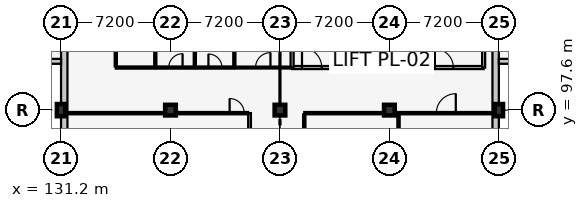
"""IFC4 building model, lengths in metres.
Left out: names, types, materials, properties, quantities, classifications, styles, units other than length and angle.
Written with IfcOpenShell. Run it as: python <this file> out.ifc"""

import sys

from ifc_helpers import new_model, si_unit, direction, frame, frame_2d, origin, origin_2d, place, context, subcontext, project, spatial, rectangle, extrude, element, fill, save


model = new_model("IFC4")
c1 = context("Model", 3, precision=1e-05, world=origin(), true_north=direction((0.0, 1.0)))
c2 = subcontext(c1, "Body", "Model", "MODEL_VIEW")
j1 = project(units=[si_unit("LENGTHUNIT", "METRE"), si_unit("PLANEANGLEUNIT", "RADIAN")], contexts=[c1])
p1 = place(None, origin())
s1 = spatial("IfcSite", under=j1, at=p1, CompositionType="ELEMENT")
p2 = place(p1, origin())
s2 = spatial("IfcBuilding", under=s1, at=p2, CompositionType="ELEMENT")
p3 = place(p2, frame((0.0, 0.0, 9.6)))
s3 = spatial("IfcBuildingStorey", under=s2, at=p3, CompositionType="ELEMENT", Elevation=9.6)
p4 = place(p3, frame((131.2, 97.6, 0.0), z_axis=(0.0, 0.0, 1.0), x_axis=(1.0, 0.0, 0.0)))
e1 = element("IfcColumn", 1, at=p4, inside=s3, PredefinedType="COLUMN", context=c2, shape_type="SweptSolid", body=[
    extrude(rectangle(XDim=0.55, YDim=0.8, at=origin_2d()), origin(), (0.0, 0.0, 1.0), 4.2),
])
for number, where, z_axis, x_axis in (
    (2, (138.4, 97.6, 0.0), (0.0, 0.0, 1.0), (1.0, 0.0, 0.0)),
    (3, (145.6, 97.6, 0.0), (0.0, 0.0, 1.0), (1.0, 0.0, 0.0)),
    (4, (152.8, 97.6, 0.0), (0.0, 0.0, 1.0), (1.0, 0.0, 0.0)),
):
    element("IfcColumn", number, at=place(p3, frame(where, z_axis=z_axis, x_axis=x_axis)), inside=s3, PredefinedType="COLUMN", context=c2, shape_type="SweptSolid", body=[
        extrude(rectangle(XDim=0.7, YDim=0.7, at=origin_2d()), origin(), (0.0, 0.0, 1.0), 4.2),
    ])
p5 = place(p3, frame((160.0, 97.6, 0.0), z_axis=(0.0, 0.0, 1.0), x_axis=(1.0, 0.0, 0.0)))
e5 = element("IfcColumn", 5, at=p5, inside=s3, PredefinedType="COLUMN", context=c2, shape_type="SweptSolid", body=[
    extrude(rectangle(XDim=0.55, YDim=0.8, at=origin_2d()), origin(), (0.0, 0.0, 1.0), 4.2),
])
p6 = place(p3, frame((159.79, 112.0, 0.0), z_axis=(0.0, 0.0, 1.0), x_axis=(0.0, -1.0, 0.0)))
e6 = element("IfcWall", 6, at=p6, inside=s3, PredefinedType="SOLIDWALL", context=c2, shape_type="SweptSolid", body=[
    extrude(rectangle(XDim=28.8, YDim=0.42, at=frame_2d((14.4, 0.0))), origin(), (0.0, 0.0, 1.0), 3.345),
])
p7 = place(p3, frame((160.0, 100.81, 0.0), z_axis=(0.0, 0.0, 1.0), x_axis=(1.0, 0.0, 0.0)))
e7 = element("IfcWall", 7, at=p7, inside=s3, PredefinedType="SOLIDWALL", context=c2, shape_type="SweptSolid", body=[
    extrude(rectangle(XDim=1.793, YDim=0.32, at=frame_2d((0.896, 0.0))), origin(), (0.0, 0.0, 1.0), 3.93),
])
p8 = place(p3, frame((131.41, 83.2, 0.0), z_axis=(0.0, 0.0, 1.0), x_axis=(0.0, 1.0, 0.0)))
e8 = element("IfcWall", 8, at=p8, inside=s3, PredefinedType="SOLIDWALL", context=c2, shape_type="SweptSolid", body=[
    extrude(rectangle(XDim=28.8, YDim=0.42, at=frame_2d((14.4, 0.0))), origin(), (0.0, 0.0, 1.0), 3.345),
])
p9 = place(p3, frame((131.2, 100.81, 0.0), z_axis=(0.0, 0.0, 1.0), x_axis=(-1.0, 0.0, 0.0)))
e9 = element("IfcWall", 9, at=p9, inside=s3, PredefinedType="SOLIDWALL", context=c2, shape_type="SweptSolid", body=[
    extrude(rectangle(XDim=1.35, YDim=0.32, at=frame_2d((0.675, 0.0))), origin(), (0.0, 0.0, 1.0), 3.93),
])
p10 = place(p3, frame((146.4, 100.4, 0.0), z_axis=(0.0, 0.0, 1.0), x_axis=(1.0, 0.0, 0.0)))
e10 = element("IfcWall", 10, at=p10, inside=s3, PredefinedType="PARTITIONING", context=c2, shape_type="SweptSolid", body=[
    extrude(rectangle(XDim=2.6, YDim=0.2, at=frame_2d((1.3, 0.0))), origin(), (0.0, 0.0, 1.0), 3.95),
])
p11 = place(p10, frame((0.65, 0.0, 0.0)))
e11 = element("IfcOpeningElement", 11, at=p11, cuts=e10, PredefinedType="OPENING", context=c2, shape_type="SweptSolid", body=[
    extrude(rectangle(XDim=1.3, YDim=2.2, at=frame_2d((0.65, 1.1))), frame((0.0, 0.112, 0.0), z_axis=(0.0, -1.0, 0.0), x_axis=(1.0, 0.0, 0.0)), (0.0, 0.0, 1.0), 0.224),
])
p12 = place(p3, frame((146.4, 106.2, 0.0), z_axis=(0.0, 0.0, 1.0), x_axis=(0.0, -1.0, 0.0)))
e12 = element("IfcWall", 12, at=p12, inside=s3, PredefinedType="PARTITIONING", context=c2, shape_type="SweptSolid", body=[
    extrude(rectangle(XDim=5.8, YDim=0.2, at=frame_2d((2.9, 0.0))), origin(), (0.0, 0.0, 1.0), 3.95),
])
p13 = place(p3, frame((149.0, 100.4, 0.0), z_axis=(0.0, 0.0, 1.0), x_axis=(0.0, 1.0, 0.0)))
e13 = element("IfcWall", 13, at=p13, inside=s3, PredefinedType="PARTITIONING", context=c2, shape_type="SweptSolid", body=[
    extrude(rectangle(XDim=5.8, YDim=0.2, at=frame_2d((2.9, 0.0))), origin(), (0.0, 0.0, 1.0), 3.705),
])
p14 = place(p3, frame((153.8, 100.4, 0.0), z_axis=(0.0, 0.0, 1.0), x_axis=(1.0, 0.0, 0.0)))
e14 = element("IfcWall", 14, at=p14, inside=s3, PredefinedType="PARTITIONING", context=c2, shape_type="SweptSolid", body=[
    extrude(rectangle(XDim=5.2, YDim=0.2, at=frame_2d((2.6, 0.0))), origin(), (0.0, 0.0, 1.0), 3.95),
])
p15 = place(p14, frame((1.99, 0.0, 0.0)))
e15 = element("IfcOpeningElement", 15, at=p15, cuts=e14, PredefinedType="OPENING", context=c2, shape_type="SweptSolid", body=[
    extrude(rectangle(XDim=1.22, YDim=2.2, at=frame_2d((0.61, 1.1))), frame((0.0, 0.112, 0.0), z_axis=(0.0, -1.0, 0.0), x_axis=(1.0, 0.0, 0.0)), (0.0, 0.0, 1.0), 0.224),
])
for number, where, z_axis, x_axis in (
    (16, (153.8, 106.2, 0.0), (0.0, 0.0, 1.0), (0.0, -1.0, 0.0)),
    (17, (159.0, 100.4, 0.0), (0.0, 0.0, 1.0), (0.0, 1.0, 0.0)),
):
    element("IfcWall", number, at=place(p3, frame(where, z_axis=z_axis, x_axis=x_axis)), inside=s3, PredefinedType="PARTITIONING", context=c2, shape_type="SweptSolid", body=[
        extrude(rectangle(XDim=5.8, YDim=0.2, at=frame_2d((2.9, 0.0))), origin(), (0.0, 0.0, 1.0), 3.95),
    ])
p16 = place(p3, frame((143.6, 83.63, 0.0), z_axis=(0.0, 0.0, 1.0), x_axis=(0.0, 1.0, 0.0)))
e18 = element("IfcWall", 18, at=p16, inside=s3, PredefinedType="PARTITIONING", context=c2, shape_type="SweptSolid", body=[
    extrude(rectangle(XDim=13.77, YDim=0.18, at=frame_2d((6.885, 0.0))), origin(), (0.0, 0.0, 1.0), 3.95),
])
p17 = place(p16, frame((2.925, 0.0, 0.0)))
e19 = element("IfcOpeningElement", 19, at=p17, cuts=e18, PredefinedType="OPENING", context=c2, shape_type="SweptSolid", body=[
    extrude(rectangle(XDim=0.92, YDim=2.08, at=frame_2d((0.46, 1.04))), frame((0.0, 0.102, 0.0), z_axis=(0.0, -1.0, 0.0), x_axis=(1.0, 0.0, 0.0)), (0.0, 0.0, 1.0), 0.204),
])
p18 = place(p3, frame((134.8, 100.4, 0.0), z_axis=(0.0, 0.0, 1.0), x_axis=(1.0, 0.0, 0.0)))
e20 = element("IfcWall", 20, at=p18, inside=s3, PredefinedType="PARTITIONING", context=c2, shape_type="SweptSolid", body=[
    extrude(rectangle(XDim=2.6, YDim=0.14, at=frame_2d((1.3, 0.0))), origin(), (0.0, 0.0, 1.0), 3.95),
])
p19 = place(p3, frame((134.8, 100.48, 0.0), z_axis=(0.0, 0.0, 1.0), x_axis=(0.0, 1.0, 0.0)))
e21 = element("IfcWall", 21, at=p19, inside=s3, PredefinedType="PARTITIONING", context=c2, shape_type="SweptSolid", body=[
    extrude(rectangle(XDim=4.86, YDim=0.14, at=frame_2d((2.43, 0.0))), origin(), (0.0, 0.0, 1.0), 3.675),
])
p20 = place(p19, frame((1.93, 0.0, 0.0)))
e22 = element("IfcOpeningElement", 22, at=p20, cuts=e21, PredefinedType="OPENING", context=c2, shape_type="SweptSolid", body=[
    extrude(rectangle(XDim=1.0, YDim=2.1, at=frame_2d((0.5, 1.05))), frame((0.0, 0.082, 0.0), z_axis=(0.0, -1.0, 0.0), x_axis=(1.0, 0.0, 0.0)), (0.0, 0.0, 1.0), 0.164),
])
p21 = place(p3, frame((137.4, 100.48, 0.0), z_axis=(0.0, 0.0, 1.0), x_axis=(0.0, 1.0, 0.0)))
e23 = element("IfcWall", 23, at=p21, inside=s3, PredefinedType="PARTITIONING", context=c2, shape_type="SweptSolid", body=[
    extrude(rectangle(XDim=4.86, YDim=0.14, at=frame_2d((2.43, 0.0))), origin(), (0.0, 0.0, 1.0), 3.95),
])
p22 = place(p3, frame((137.48, 100.4, 0.0), z_axis=(0.0, 0.0, 1.0), x_axis=(1.0, 0.0, 0.0)))
e24 = element("IfcWall", 24, at=p22, inside=s3, PredefinedType="PARTITIONING", context=c2, shape_type="SweptSolid", body=[
    extrude(rectangle(XDim=2.52, YDim=0.14, at=frame_2d((1.26, 0.0))), origin(), (0.0, 0.0, 1.0), 3.95),
])
p23 = place(p22, frame((0.805, 0.0, 0.0)))
e25 = element("IfcOpeningElement", 25, at=p23, cuts=e24, PredefinedType="OPENING", context=c2, shape_type="SweptSolid", body=[
    extrude(rectangle(XDim=0.91, YDim=2.06, at=frame_2d((0.455, 1.03))), frame((0.0, 0.082, 0.0), z_axis=(0.0, -1.0, 0.0), x_axis=(1.0, 0.0, 0.0)), (0.0, 0.0, 1.0), 0.164),
])
p24 = place(p3, frame((140.0, 100.48, 0.0), z_axis=(0.0, 0.0, 1.0), x_axis=(0.0, 1.0, 0.0)))
e26 = element("IfcWall", 26, at=p24, inside=s3, PredefinedType="PARTITIONING", context=c2, shape_type="SweptSolid", body=[
    extrude(rectangle(XDim=4.86, YDim=0.14, at=frame_2d((2.43, 0.0))), origin(), (0.0, 0.0, 1.0), 3.95),
])
p25 = place(p3, frame((140.08, 100.4, 0.0), z_axis=(0.0, 0.0, 1.0), x_axis=(1.0, 0.0, 0.0)))
e27 = element("IfcWall", 27, at=p25, inside=s3, PredefinedType="PARTITIONING", context=c2, shape_type="SweptSolid", body=[
    extrude(rectangle(XDim=2.52, YDim=0.14, at=frame_2d((1.26, 0.0))), origin(), (0.0, 0.0, 1.0), 3.95),
])
p26 = place(p25, frame((0.815, 0.0, 0.0)))
e28 = element("IfcOpeningElement", 28, at=p26, cuts=e27, PredefinedType="OPENING", context=c2, shape_type="SweptSolid", body=[
    extrude(rectangle(XDim=0.89, YDim=2.05, at=frame_2d((0.445, 1.025))), frame((0.0, 0.082, 0.0), z_axis=(0.0, -1.0, 0.0), x_axis=(1.0, 0.0, 0.0)), (0.0, 0.0, 1.0), 0.164),
])
p27 = place(p3, frame((142.6, 100.48, 0.0), z_axis=(0.0, 0.0, 1.0), x_axis=(0.0, 1.0, 0.0)))
e29 = element("IfcWall", 29, at=p27, inside=s3, PredefinedType="PARTITIONING", context=c2, shape_type="SweptSolid", body=[
    extrude(rectangle(XDim=4.86, YDim=0.14, at=frame_2d((2.43, 0.0))), origin(), (0.0, 0.0, 1.0), 3.95),
])
p28 = place(p3, frame((142.68, 100.4, 0.0), z_axis=(0.0, 0.0, 1.0), x_axis=(1.0, 0.0, 0.0)))
e30 = element("IfcWall", 30, at=p28, inside=s3, PredefinedType="PARTITIONING", context=c2, shape_type="SweptSolid", body=[
    extrude(rectangle(XDim=3.61, YDim=0.125, at=frame_2d((1.805, 0.0))), origin(), (0.0, 0.0, 1.0), 3.95),
])
p29 = place(p28, frame((1.315, 0.0, 0.0)))
e31 = element("IfcOpeningElement", 31, at=p29, cuts=e30, PredefinedType="OPENING", context=c2, shape_type="SweptSolid", body=[
    extrude(rectangle(XDim=0.98, YDim=2.12, at=frame_2d((0.49, 1.06))), frame((0.0, 0.074, 0.0), z_axis=(0.0, -1.0, 0.0), x_axis=(1.0, 0.0, 0.0)), (0.0, 0.0, 1.0), 0.149),
])
p30 = place(p3, frame((131.63, 97.4, 0.0), z_axis=(0.0, 0.0, 1.0), x_axis=(1.0, 0.0, 0.0)))
e32 = element("IfcWall", 32, at=p30, inside=s3, PredefinedType="PARTITIONING", context=c2, shape_type="SweptSolid", body=[
    extrude(rectangle(XDim=11.87, YDim=0.15, at=frame_2d((5.935, 0.0))), origin(), (0.0, 0.0, 1.0), 3.225),
])
p31 = place(p30, frame((10.66, 0.0, 0.0)))
e33 = element("IfcOpeningElement", 33, at=p31, cuts=e32, PredefinedType="OPENING", context=c2, shape_type="SweptSolid", body=[
    extrude(rectangle(XDim=0.96, YDim=2.1, at=frame_2d((0.48, 1.05))), frame((0.0, 0.087, 0.0), z_axis=(0.0, -1.0, 0.0), x_axis=(1.0, 0.0, 0.0)), (0.0, 0.0, 1.0), 0.174),
])
p32 = place(p3, frame((147.2, 97.4, 0.0), z_axis=(0.0, 0.0, 1.0), x_axis=(1.0, 0.0, 0.0)))
e34 = element("IfcWall", 34, at=p32, inside=s3, PredefinedType="PARTITIONING", context=c2, shape_type="SweptSolid", body=[
    extrude(rectangle(XDim=6.2, YDim=0.15, at=frame_2d((3.1, 0.0))), origin(), (0.0, 0.0, 1.0), 3.075),
])
p33 = place(p3, frame((147.2, 90.485, 0.0), z_axis=(0.0, 0.0, 1.0), x_axis=(0.0, 1.0, 0.0)))
e35 = element("IfcWall", 35, at=p33, inside=s3, PredefinedType="PARTITIONING", context=c2, shape_type="SweptSolid", body=[
    extrude(rectangle(XDim=6.83, YDim=0.15, at=frame_2d((3.415, 0.0))), origin(), (0.0, 0.0, 1.0), 3.95),
])
p34 = place(p33, frame((2.945, 0.0, 0.0)))
e36 = element("IfcOpeningElement", 36, at=p34, cuts=e35, PredefinedType="OPENING", context=c2, shape_type="SweptSolid", body=[
    extrude(rectangle(XDim=0.94, YDim=2.1, at=frame_2d((0.47, 1.05))), frame((0.0, 0.087, 0.0), z_axis=(0.0, -1.0, 0.0), x_axis=(1.0, 0.0, 0.0)), (0.0, 0.0, 1.0), 0.174),
])
p35 = place(p3, frame((153.4, 90.485, 0.0), z_axis=(0.0, 0.0, 1.0), x_axis=(0.0, 1.0, 0.0)))
e37 = element("IfcWall", 37, at=p35, inside=s3, PredefinedType="PARTITIONING", context=c2, shape_type="SweptSolid", body=[
    extrude(rectangle(XDim=6.83, YDim=0.15, at=frame_2d((3.415, 0.0))), origin(), (0.0, 0.0, 1.0), 3.95),
])
p36 = place(p3, frame((153.485, 97.4, 0.0), z_axis=(0.0, 0.0, 1.0), x_axis=(1.0, 0.0, 0.0)))
e38 = element("IfcWall", 38, at=p36, inside=s3, PredefinedType="PARTITIONING", context=c2, shape_type="SweptSolid", body=[
    extrude(rectangle(XDim=6.085, YDim=0.15, at=frame_2d((3.042, 0.0))), origin(), (0.0, 0.0, 1.0), 3.075),
])
p37 = place(p36, frame((2.403, 0.0, 0.0)))
e39 = element("IfcOpeningElement", 39, at=p37, cuts=e38, PredefinedType="OPENING", context=c2, shape_type="SweptSolid", body=[
    extrude(rectangle(XDim=1.28, YDim=2.2, at=frame_2d((0.64, 1.1))), frame((0.0, 0.087, 0.0), z_axis=(0.0, -1.0, 0.0), x_axis=(1.0, 0.0, 0.0)), (0.0, 0.0, 1.0), 0.174),
])
p38 = place(p11, origin())
e40 = element("IfcDoor", 40, at=p38, inside=s3, OperationType="SINGLE_SWING_LEFT", PredefinedType="DOOR", context=c2, shape_type="SweptSolid", body=[
    extrude(rectangle(XDim=1.3, YDim=2.2, at=frame_2d((0.65, 1.1))), frame((0.0, 0.025, 0.0), z_axis=(0.0, -1.0, 0.0), x_axis=(1.0, 0.0, 0.0)), (0.0, 0.0, 1.0), 0.05),
])
fill(e11, e40)
p39 = place(p15, origin())
e41 = element("IfcDoor", 41, at=p39, inside=s3, OperationType="SINGLE_SWING_LEFT", PredefinedType="DOOR", context=c2, shape_type="SweptSolid", body=[
    extrude(rectangle(XDim=1.22, YDim=2.2, at=frame_2d((0.61, 1.1))), frame((0.0, 0.025, 0.0), z_axis=(0.0, -1.0, 0.0), x_axis=(1.0, 0.0, 0.0)), (0.0, 0.0, 1.0), 0.05),
])
fill(e15, e41)
p40 = place(p23, origin())
e42 = element("IfcDoor", 42, at=p40, inside=s3, OperationType="SINGLE_SWING_RIGHT", PredefinedType="DOOR", context=c2, shape_type="SweptSolid", body=[
    extrude(rectangle(XDim=0.91, YDim=2.06, at=frame_2d((0.455, 1.03))), frame((0.0, 0.025, 0.0), z_axis=(0.0, -1.0, 0.0), x_axis=(1.0, 0.0, 0.0)), (0.0, 0.0, 1.0), 0.05),
])
fill(e25, e42)
p41 = place(p26, origin())
e43 = element("IfcDoor", 43, at=p41, inside=s3, OperationType="SINGLE_SWING_LEFT", PredefinedType="DOOR", context=c2, shape_type="SweptSolid", body=[
    extrude(rectangle(XDim=0.89, YDim=2.05, at=frame_2d((0.445, 1.025))), frame((0.0, 0.025, 0.0), z_axis=(0.0, -1.0, 0.0), x_axis=(1.0, 0.0, 0.0)), (0.0, 0.0, 1.0), 0.05),
])
fill(e28, e43)
p42 = place(p29, origin())
e44 = element("IfcDoor", 44, at=p42, inside=s3, OperationType="SINGLE_SWING_RIGHT", PredefinedType="DOOR", context=c2, shape_type="SweptSolid", body=[
    extrude(rectangle(XDim=0.98, YDim=2.12, at=frame_2d((0.49, 1.06))), frame((0.0, 0.025, 0.0), z_axis=(0.0, -1.0, 0.0), x_axis=(1.0, 0.0, 0.0)), (0.0, 0.0, 1.0), 0.05),
])
fill(e31, e44)
p43 = place(p31, origin())
e45 = element("IfcDoor", 45, at=p43, inside=s3, OperationType="SINGLE_SWING_LEFT", PredefinedType="DOOR", context=c2, shape_type="SweptSolid", body=[
    extrude(rectangle(XDim=0.96, YDim=2.1, at=frame_2d((0.48, 1.05))), frame((0.0, 0.025, 0.0), z_axis=(0.0, -1.0, 0.0), x_axis=(1.0, 0.0, 0.0)), (0.0, 0.0, 1.0), 0.05),
])
fill(e33, e45)
p44 = place(p37, origin())
e46 = element("IfcDoor", 46, at=p44, inside=s3, OperationType="SINGLE_SWING_RIGHT", PredefinedType="DOOR", context=c2, shape_type="SweptSolid", body=[
    extrude(rectangle(XDim=1.28, YDim=2.2, at=frame_2d((0.64, 1.1))), frame((0.0, 0.025, 0.0), z_axis=(0.0, -1.0, 0.0), x_axis=(1.0, 0.0, 0.0)), (0.0, 0.0, 1.0), 0.05),
])
fill(e39, e46)
save(model, sys.argv[1])
